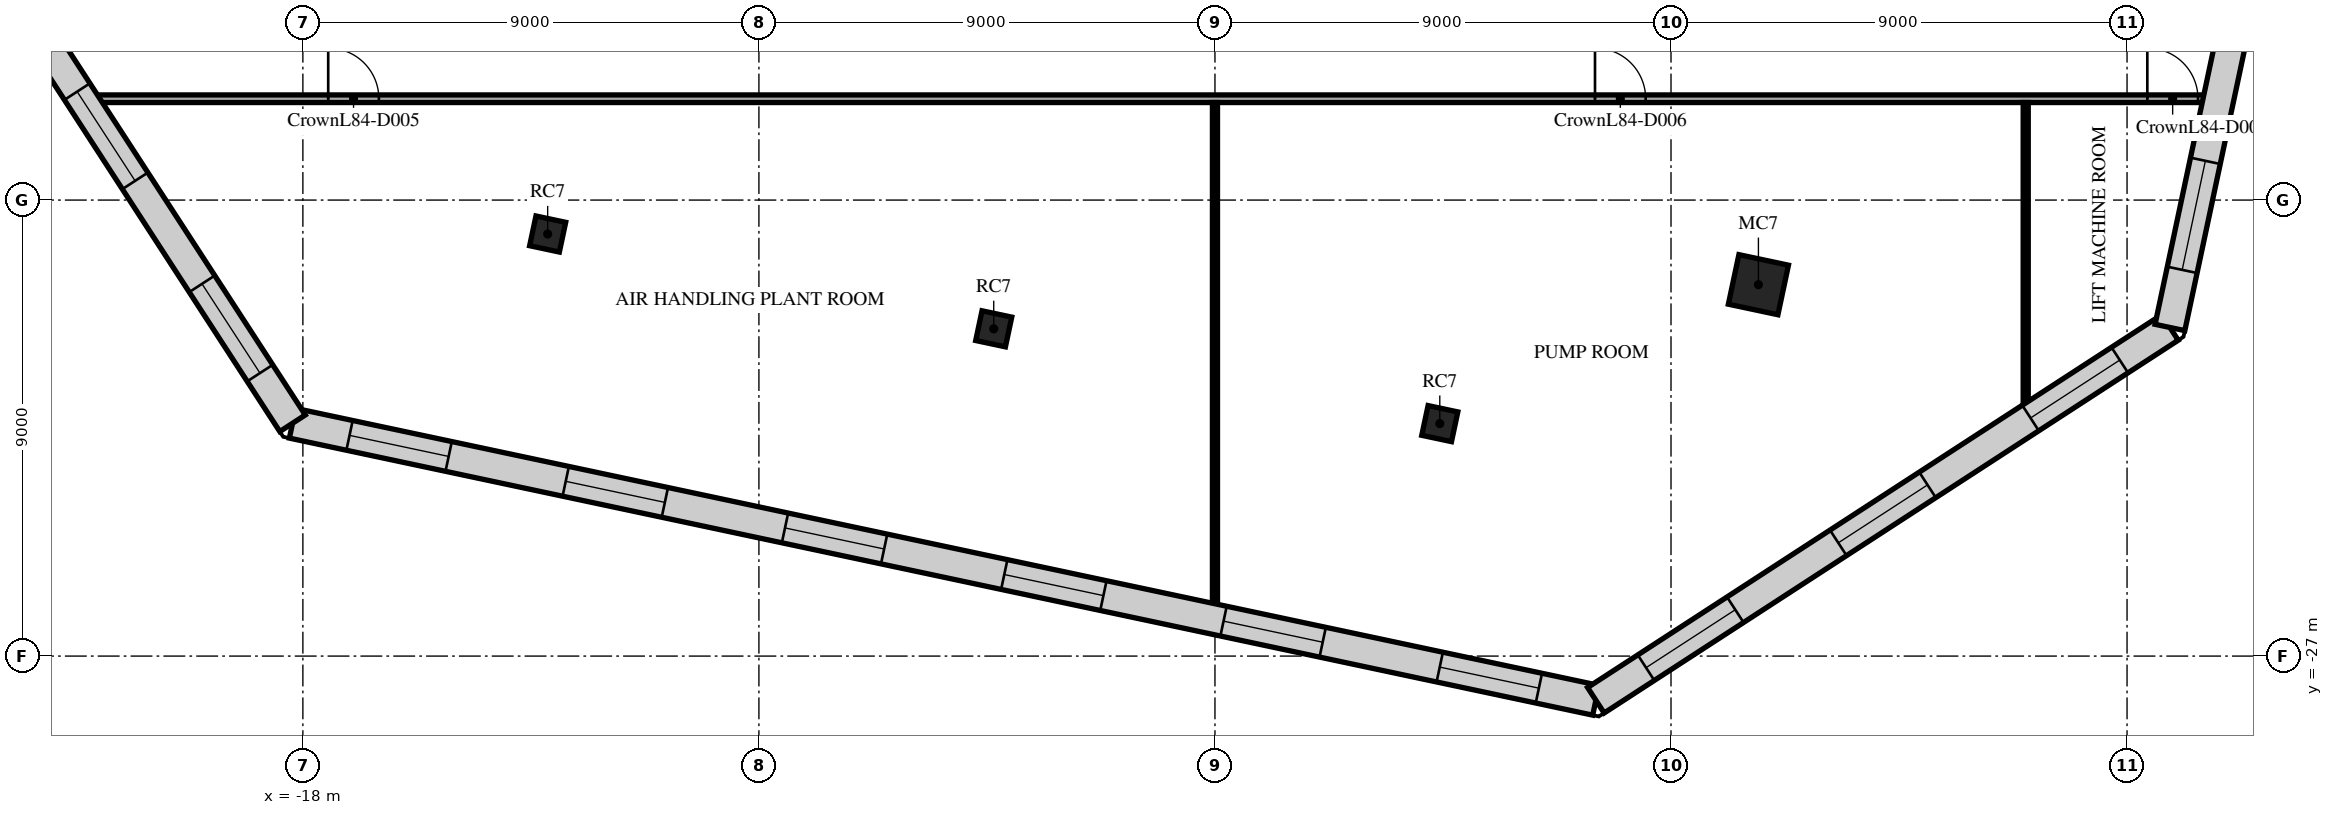
"""IFC4 building model, lengths in metres.
Left out: names, types, materials, properties, quantities, classifications, styles, units other than length and angle.
Written with IfcOpenShell. Run it as: python <this file> out.ifc"""

import sys

from ifc_helpers import new_model, si_unit, direction, frame, frame_2d, origin, origin_2d, place, context, subcontext, project, spatial, rectangle, extrude, element, fill, save


model = new_model("IFC4")
c1 = context("Model", 3, precision=1e-05, world=origin(), true_north=direction((0.0, 1.0)))
c2 = subcontext(c1, "Body", "Model", "MODEL_VIEW")
j1 = project(units=[si_unit("LENGTHUNIT", "METRE"), si_unit("PLANEANGLEUNIT", "RADIAN")], contexts=[c1])
p1 = place(None, origin())
s1 = spatial("IfcSite", under=j1, at=p1, CompositionType="ELEMENT")
p2 = place(p1, origin())
s2 = spatial("IfcBuilding", under=s1, at=p2, CompositionType="ELEMENT")
p3 = place(p2, frame((0.0, 0.0, 358.1)))
s3 = spatial("IfcBuildingStorey", under=s2, at=p3, CompositionType="ELEMENT", Elevation=358.1)
for number, where, z_axis, x_axis in (
    (1, (-13.169, -18.67, 0.0), (0.0, 0.0, 1.0), (0.208, 0.978, 0.0)),
    (2, (-4.366, -20.541, 0.0), (0.0, 0.0, 1.0), (0.208, 0.978, 0.0)),
    (3, (4.437, -22.412, 0.0), (0.0, 0.0, 1.0), (0.208, 0.978, 0.0)),
):
    element("IfcColumn", number, at=place(p3, frame(where, z_axis=z_axis, x_axis=x_axis)), inside=s3, PredefinedType="COLUMN", context=c2, shape_type="SweptSolid", body=[
        extrude(rectangle(XDim=0.6, YDim=0.6, at=origin_2d()), origin(), (0.0, 0.0, 1.0), 5.0),
    ])
p4 = place(p3, frame((10.725, -19.67, 0.0), z_axis=(0.0, 0.0, 1.0), x_axis=(0.207911690818, 0.978147600734, 0.0)))
e4 = element("IfcColumn", 4, at=p4, inside=s3, PredefinedType="COLUMN", context=c2, shape_type="SweptSolid", body=[
    extrude(rectangle(XDim=1.0, YDim=1.0, at=origin_2d()), origin(), (0.0, 0.0, 1.0), 5.0),
])
p5 = place(p3, frame((-22.244, -16.0, 0.0), z_axis=(0.0, 0.0, 1.0), x_axis=(1.0, 0.0, 0.0)))
e5 = element("IfcWall", 5, at=p5, inside=s3, PredefinedType="PARTITIONING", context=c2, shape_type="SweptSolid", body=[
    extrude(rectangle(XDim=41.948, YDim=0.15, at=frame_2d((20.974, 0.0))), origin(), (0.0, 0.0, 1.0), 4.32),
])
p6 = place(p5, frame((4.744, 0.0, 0.0)))
e6 = element("IfcOpeningElement", 6, at=p6, cuts=e5, PredefinedType="OPENING", context=c2, shape_type="SweptSolid", body=[
    extrude(rectangle(XDim=1.0, YDim=2.1, at=frame_2d((0.5, 1.05))), frame((0.0, 0.085, 0.0), z_axis=(0.0, -1.0, 0.0), x_axis=(1.0, 0.0, 0.0)), (0.0, 0.0, 1.0), 0.17),
])
p7 = place(p5, frame((29.744, 0.0, 0.0)))
e7 = element("IfcOpeningElement", 7, at=p7, cuts=e5, PredefinedType="OPENING", context=c2, shape_type="SweptSolid", body=[
    extrude(rectangle(XDim=1.0, YDim=2.1, at=frame_2d((0.5, 1.05))), frame((0.0, 0.085, 0.0), z_axis=(0.0, -1.0, 0.0), x_axis=(1.0, 0.0, 0.0)), (0.0, 0.0, 1.0), 0.17),
])
p8 = place(p5, frame((40.644, 0.0, 0.0)))
e8 = element("IfcOpeningElement", 8, at=p8, cuts=e5, PredefinedType="OPENING", context=c2, shape_type="SweptSolid", body=[
    extrude(rectangle(XDim=1.0, YDim=2.1, at=frame_2d((0.5, 1.05))), frame((0.0, 0.085, 0.0), z_axis=(0.0, -1.0, 0.0), x_axis=(1.0, 0.0, 0.0)), (0.0, 0.0, 1.0), 0.17),
])
p9 = place(p3, frame((0.0, -26.172, 0.0), z_axis=(0.0, 0.0, 1.0), x_axis=(0.0, 1.0, 0.0)))
e9 = element("IfcWall", 9, at=p9, inside=s3, PredefinedType="PARTITIONING", context=c2, shape_type="SweptSolid", body=[
    extrude(rectangle(XDim=10.097, YDim=0.1, at=frame_2d((5.048, 0.0))), origin(), (0.0, 0.0, 1.0), 4.7),
])
p10 = place(p3, frame((16.0, -22.244, 0.0), z_axis=(0.0, 0.0, 1.0), x_axis=(0.0, 1.0, 0.0)))
e10 = element("IfcWall", 10, at=p10, inside=s3, PredefinedType="PARTITIONING", context=c2, shape_type="SweptSolid", body=[
    extrude(rectangle(XDim=6.169, YDim=0.1, at=frame_2d((3.084, 0.0))), origin(), (0.0, 0.0, 1.0), 4.7),
])
p11 = place(p3, frame((-18.204, -22.405, 0.0), z_axis=(0.0, 0.0, 1.0), x_axis=(0.978146602716, -0.207916386066, 0.0)))
e11 = element("IfcWall", 11, at=p11, inside=s3, PredefinedType="STANDARD", context=c2, shape_type="SweptSolid", body=[
    extrude(rectangle(XDim=26.296, YDim=0.6, at=frame_2d((13.148, 0.0))), origin(), (0.0, 0.0, 1.0), 4.7),
])
p12 = place(p11, frame((1.15, 0.0, 0.6)))
e12 = element("IfcOpeningElement", 12, at=p12, cuts=e11, PredefinedType="OPENING", context=c2, shape_type="SweptSolid", body=[
    extrude(rectangle(XDim=2.0, YDim=3.35, at=frame_2d((1.0, 1.675))), frame((0.0, 0.31, 0.0), z_axis=(0.0, -1.0, 0.0), x_axis=(1.0, 0.0, 0.0)), (0.0, 0.0, 1.0), 0.62),
])
p13 = place(p11, frame((5.512, 0.0, 0.6)))
e13 = element("IfcOpeningElement", 13, at=p13, cuts=e11, PredefinedType="OPENING", context=c2, shape_type="SweptSolid", body=[
    extrude(rectangle(XDim=2.0, YDim=3.35, at=frame_2d((1.0, 1.675))), frame((0.0, 0.31, 0.0), z_axis=(0.0, -1.0, 0.0), x_axis=(1.0, 0.0, 0.0)), (0.0, 0.0, 1.0), 0.62),
])
p14 = place(p11, frame((9.936, 0.0, 0.6)))
e14 = element("IfcOpeningElement", 14, at=p14, cuts=e11, PredefinedType="OPENING", context=c2, shape_type="SweptSolid", body=[
    extrude(rectangle(XDim=2.0, YDim=3.35, at=frame_2d((1.0, 1.675))), frame((0.0, 0.31, 0.0), z_axis=(0.0, -1.0, 0.0), x_axis=(1.0, 0.0, 0.0)), (0.0, 0.0, 1.0), 0.62),
])
p15 = place(p11, frame((14.36, 0.0, 0.6)))
e15 = element("IfcOpeningElement", 15, at=p15, cuts=e11, PredefinedType="OPENING", context=c2, shape_type="SweptSolid", body=[
    extrude(rectangle(XDim=2.0, YDim=3.35, at=frame_2d((1.0, 1.675))), frame((0.0, 0.31, 0.0), z_axis=(0.0, -1.0, 0.0), x_axis=(1.0, 0.0, 0.0)), (0.0, 0.0, 1.0), 0.62),
])
p16 = place(p11, frame((18.784, 0.0, 0.6)))
e16 = element("IfcOpeningElement", 16, at=p16, cuts=e11, PredefinedType="OPENING", context=c2, shape_type="SweptSolid", body=[
    extrude(rectangle(XDim=2.0, YDim=3.35, at=frame_2d((1.0, 1.675))), frame((0.0, 0.31, 0.0), z_axis=(0.0, -1.0, 0.0), x_axis=(1.0, 0.0, 0.0)), (0.0, 0.0, 1.0), 0.62),
])
p17 = place(p11, frame((23.146, 0.0, 0.6)))
e17 = element("IfcOpeningElement", 17, at=p17, cuts=e11, PredefinedType="OPENING", context=c2, shape_type="SweptSolid", body=[
    extrude(rectangle(XDim=2.0, YDim=3.35, at=frame_2d((1.0, 1.675))), frame((0.0, 0.31, 0.0), z_axis=(0.0, -1.0, 0.0), x_axis=(1.0, 0.0, 0.0)), (0.0, 0.0, 1.0), 0.62),
])
p18 = place(p3, frame((7.517, -27.872, 0.0), z_axis=(0.0, 0.0, 1.0), x_axis=(0.838665687332, 0.544646550427, 0.0)))
e18 = element("IfcWall", 18, at=p18, inside=s3, PredefinedType="STANDARD", context=c2, shape_type="SweptSolid", body=[
    extrude(rectangle(XDim=13.509, YDim=0.6, at=frame_2d((6.754, 0.0))), origin(), (0.0, 0.0, 1.0), 4.7),
])
p19 = place(p18, frame((1.181, 0.0, 0.6)))
e19 = element("IfcOpeningElement", 19, at=p19, cuts=e18, PredefinedType="OPENING", context=c2, shape_type="SweptSolid", body=[
    extrude(rectangle(XDim=2.1, YDim=3.35, at=frame_2d((1.05, 1.675))), frame((0.0, 0.31, 0.0), z_axis=(0.0, -1.0, 0.0), x_axis=(1.0, 0.0, 0.0)), (0.0, 0.0, 1.0), 0.62),
])
p20 = place(p18, frame((5.704, 0.0, 0.6)))
e20 = element("IfcOpeningElement", 20, at=p20, cuts=e18, PredefinedType="OPENING", context=c2, shape_type="SweptSolid", body=[
    extrude(rectangle(XDim=2.1, YDim=3.35, at=frame_2d((1.05, 1.675))), frame((0.0, 0.31, 0.0), z_axis=(0.0, -1.0, 0.0), x_axis=(1.0, 0.0, 0.0)), (0.0, 0.0, 1.0), 0.62),
])
p21 = place(p18, frame((10.228, 0.0, 0.6)))
e21 = element("IfcOpeningElement", 21, at=p21, cuts=e18, PredefinedType="OPENING", context=c2, shape_type="SweptSolid", body=[
    extrude(rectangle(XDim=2.1, YDim=3.35, at=frame_2d((1.05, 1.675))), frame((0.0, 0.31, 0.0), z_axis=(0.0, -1.0, 0.0), x_axis=(1.0, 0.0, 0.0)), (0.0, 0.0, 1.0), 0.62),
])
p22 = place(p3, frame((18.847, -20.514, 0.0), z_axis=(0.0, 0.0, 1.0), x_axis=(0.207910832809, 0.978147783109, 0.0)))
e22 = element("IfcWall", 22, at=p22, inside=s3, PredefinedType="STANDARD", context=c2, shape_type="SweptSolid", body=[
    extrude(rectangle(XDim=32.296, YDim=0.6, at=frame_2d((16.148, 0.0))), origin(), (0.0, 0.0, 1.0), 4.7),
])
p23 = place(p22, frame((1.163, 0.0, 0.6)))
e23 = element("IfcOpeningElement", 23, at=p23, cuts=e22, PredefinedType="OPENING", context=c2, shape_type="SweptSolid", body=[
    extrude(rectangle(XDim=2.2, YDim=3.35, at=frame_2d((1.1, 1.675))), frame((0.0, 0.31, 0.0), z_axis=(0.0, -1.0, 0.0), x_axis=(1.0, 0.0, 0.0)), (0.0, 0.0, 1.0), 0.62),
])
p24 = place(p22, frame((5.75, 0.0, 0.6)))
e24 = element("IfcOpeningElement", 24, at=p24, cuts=e22, PredefinedType="OPENING", context=c2, shape_type="SweptSolid", body=[
    extrude(rectangle(XDim=2.2, YDim=3.35, at=frame_2d((1.1, 1.675))), frame((0.0, 0.31, 0.0), z_axis=(0.0, -1.0, 0.0), x_axis=(1.0, 0.0, 0.0)), (0.0, 0.0, 1.0), 0.62),
])
p25 = place(p22, frame((10.399, 0.0, 0.6)))
e25 = element("IfcOpeningElement", 25, at=p25, cuts=e22, PredefinedType="OPENING", context=c2, shape_type="SweptSolid", body=[
    extrude(rectangle(XDim=2.2, YDim=3.35, at=frame_2d((1.1, 1.675))), frame((0.0, 0.31, 0.0), z_axis=(0.0, -1.0, 0.0), x_axis=(1.0, 0.0, 0.0)), (0.0, 0.0, 1.0), 0.62),
])
p26 = place(p22, frame((15.048, 0.0, 0.6)))
e26 = element("IfcOpeningElement", 26, at=p26, cuts=e22, PredefinedType="OPENING", context=c2, shape_type="SweptSolid", body=[
    extrude(rectangle(XDim=2.2, YDim=3.35, at=frame_2d((1.1, 1.675))), frame((0.0, 0.31, 0.0), z_axis=(0.0, -1.0, 0.0), x_axis=(1.0, 0.0, 0.0)), (0.0, 0.0, 1.0), 0.62),
])
p27 = place(p22, frame((19.697, 0.0, 0.6)))
e27 = element("IfcOpeningElement", 27, at=p27, cuts=e22, PredefinedType="OPENING", context=c2, shape_type="SweptSolid", body=[
    extrude(rectangle(XDim=2.2, YDim=3.35, at=frame_2d((1.1, 1.675))), frame((0.0, 0.31, 0.0), z_axis=(0.0, -1.0, 0.0), x_axis=(1.0, 0.0, 0.0)), (0.0, 0.0, 1.0), 0.62),
])
p28 = place(p22, frame((24.346, 0.0, 0.6)))
e28 = element("IfcOpeningElement", 28, at=p28, cuts=e22, PredefinedType="OPENING", context=c2, shape_type="SweptSolid", body=[
    extrude(rectangle(XDim=2.2, YDim=3.35, at=frame_2d((1.1, 1.675))), frame((0.0, 0.31, 0.0), z_axis=(0.0, -1.0, 0.0), x_axis=(1.0, 0.0, 0.0)), (0.0, 0.0, 1.0), 0.62),
])
p29 = place(p22, frame((28.933, 0.0, 0.6)))
e29 = element("IfcOpeningElement", 29, at=p29, cuts=e22, PredefinedType="OPENING", context=c2, shape_type="SweptSolid", body=[
    extrude(rectangle(XDim=2.2, YDim=3.35, at=frame_2d((1.1, 1.675))), frame((0.0, 0.31, 0.0), z_axis=(0.0, -1.0, 0.0), x_axis=(1.0, 0.0, 0.0)), (0.0, 0.0, 1.0), 0.62),
])
p30 = place(p3, frame((-25.561, -11.075, 0.0), z_axis=(0.0, 0.0, 1.0), x_axis=(0.544642093959, -0.838668581436, 0.0)))
e30 = element("IfcWall", 30, at=p30, inside=s3, PredefinedType="STANDARD", context=c2, shape_type="SweptSolid", body=[
    extrude(rectangle(XDim=13.509, YDim=0.6, at=frame_2d((6.754, 0.0))), origin(), (0.0, 0.0, 1.0), 4.7),
])
p31 = place(p30, frame((1.181, 0.0, 0.6)))
e31 = element("IfcOpeningElement", 31, at=p31, cuts=e30, PredefinedType="OPENING", context=c2, shape_type="SweptSolid", body=[
    extrude(rectangle(XDim=2.1, YDim=3.35, at=frame_2d((1.05, 1.675))), frame((0.0, 0.31, 0.0), z_axis=(0.0, -1.0, 0.0), x_axis=(1.0, 0.0, 0.0)), (0.0, 0.0, 1.0), 0.62),
])
p32 = place(p30, frame((5.704, 0.0, 0.6)))
e32 = element("IfcOpeningElement", 32, at=p32, cuts=e30, PredefinedType="OPENING", context=c2, shape_type="SweptSolid", body=[
    extrude(rectangle(XDim=2.1, YDim=3.35, at=frame_2d((1.05, 1.675))), frame((0.0, 0.31, 0.0), z_axis=(0.0, -1.0, 0.0), x_axis=(1.0, 0.0, 0.0)), (0.0, 0.0, 1.0), 0.62),
])
p33 = place(p30, frame((10.228, 0.0, 0.6)))
e33 = element("IfcOpeningElement", 33, at=p33, cuts=e30, PredefinedType="OPENING", context=c2, shape_type="SweptSolid", body=[
    extrude(rectangle(XDim=2.1, YDim=3.35, at=frame_2d((1.05, 1.675))), frame((0.0, 0.31, 0.0), z_axis=(0.0, -1.0, 0.0), x_axis=(1.0, 0.0, 0.0)), (0.0, 0.0, 1.0), 0.62),
])
p34 = place(p6, origin())
e34 = element("IfcDoor", 34, at=p34, inside=s3, OperationType="SINGLE_SWING_LEFT", PredefinedType="DOOR", context=c2, shape_type="SweptSolid", body=[
    extrude(rectangle(XDim=1.0, YDim=2.1, at=frame_2d((0.5, 1.05))), frame((0.0, 0.025, 0.0), z_axis=(0.0, -1.0, 0.0), x_axis=(1.0, 0.0, 0.0)), (0.0, 0.0, 1.0), 0.05),
])
fill(e6, e34)
p35 = place(p7, origin())
e35 = element("IfcDoor", 35, at=p35, inside=s3, OperationType="SINGLE_SWING_RIGHT", PredefinedType="DOOR", context=c2, shape_type="SweptSolid", body=[
    extrude(rectangle(XDim=1.0, YDim=2.1, at=frame_2d((0.5, 1.05))), frame((0.0, 0.025, 0.0), z_axis=(0.0, -1.0, 0.0), x_axis=(1.0, 0.0, 0.0)), (0.0, 0.0, 1.0), 0.05),
])
fill(e7, e35)
p36 = place(p8, origin())
e36 = element("IfcDoor", 36, at=p36, inside=s3, OperationType="SINGLE_SWING_LEFT", PredefinedType="DOOR", context=c2, shape_type="SweptSolid", body=[
    extrude(rectangle(XDim=1.0, YDim=2.1, at=frame_2d((0.5, 1.05))), frame((0.0, 0.025, 0.0), z_axis=(0.0, -1.0, 0.0), x_axis=(1.0, 0.0, 0.0)), (0.0, 0.0, 1.0), 0.05),
])
fill(e8, e36)
p37 = place(p12, origin())
e37 = element("IfcWindow", 37, at=p37, inside=s3, PartitioningType="SINGLE_PANEL", PredefinedType="USERDEFINED", context=c2, shape_type="SweptSolid", body=[
    extrude(rectangle(XDim=2.0, YDim=3.35, at=frame_2d((1.0, 1.675))), frame((0.0, 0.03, 0.0), z_axis=(0.0, -1.0, 0.0), x_axis=(1.0, 0.0, 0.0)), (0.0, 0.0, 1.0), 0.06),
])
fill(e12, e37)
p38 = place(p13, origin())
e38 = element("IfcWindow", 38, at=p38, inside=s3, PartitioningType="SINGLE_PANEL", PredefinedType="USERDEFINED", context=c2, shape_type="SweptSolid", body=[
    extrude(rectangle(XDim=2.0, YDim=3.35, at=frame_2d((1.0, 1.675))), frame((0.0, 0.03, 0.0), z_axis=(0.0, -1.0, 0.0), x_axis=(1.0, 0.0, 0.0)), (0.0, 0.0, 1.0), 0.06),
])
fill(e13, e38)
p39 = place(p14, origin())
e39 = element("IfcWindow", 39, at=p39, inside=s3, PartitioningType="SINGLE_PANEL", PredefinedType="USERDEFINED", context=c2, shape_type="SweptSolid", body=[
    extrude(rectangle(XDim=2.0, YDim=3.35, at=frame_2d((1.0, 1.675))), frame((0.0, 0.03, 0.0), z_axis=(0.0, -1.0, 0.0), x_axis=(1.0, 0.0, 0.0)), (0.0, 0.0, 1.0), 0.06),
])
fill(e14, e39)
p40 = place(p15, origin())
e40 = element("IfcWindow", 40, at=p40, inside=s3, PartitioningType="SINGLE_PANEL", PredefinedType="USERDEFINED", context=c2, shape_type="SweptSolid", body=[
    extrude(rectangle(XDim=2.0, YDim=3.35, at=frame_2d((1.0, 1.675))), frame((0.0, 0.03, 0.0), z_axis=(0.0, -1.0, 0.0), x_axis=(1.0, 0.0, 0.0)), (0.0, 0.0, 1.0), 0.06),
])
fill(e15, e40)
p41 = place(p16, origin())
e41 = element("IfcWindow", 41, at=p41, inside=s3, PartitioningType="SINGLE_PANEL", PredefinedType="USERDEFINED", context=c2, shape_type="SweptSolid", body=[
    extrude(rectangle(XDim=2.0, YDim=3.35, at=frame_2d((1.0, 1.675))), frame((0.0, 0.03, 0.0), z_axis=(0.0, -1.0, 0.0), x_axis=(1.0, 0.0, 0.0)), (0.0, 0.0, 1.0), 0.06),
])
fill(e16, e41)
p42 = place(p17, origin())
e42 = element("IfcWindow", 42, at=p42, inside=s3, PartitioningType="SINGLE_PANEL", PredefinedType="USERDEFINED", context=c2, shape_type="SweptSolid", body=[
    extrude(rectangle(XDim=2.0, YDim=3.35, at=frame_2d((1.0, 1.675))), frame((0.0, 0.03, 0.0), z_axis=(0.0, -1.0, 0.0), x_axis=(1.0, 0.0, 0.0)), (0.0, 0.0, 1.0), 0.06),
])
fill(e17, e42)
p43 = place(p19, origin())
e43 = element("IfcWindow", 43, at=p43, inside=s3, PartitioningType="SINGLE_PANEL", PredefinedType="USERDEFINED", context=c2, shape_type="SweptSolid", body=[
    extrude(rectangle(XDim=2.1, YDim=3.35, at=frame_2d((1.05, 1.675))), frame((0.0, 0.03, 0.0), z_axis=(0.0, -1.0, 0.0), x_axis=(1.0, 0.0, 0.0)), (0.0, 0.0, 1.0), 0.06),
])
fill(e19, e43)
p44 = place(p20, origin())
e44 = element("IfcWindow", 44, at=p44, inside=s3, PartitioningType="SINGLE_PANEL", PredefinedType="USERDEFINED", context=c2, shape_type="SweptSolid", body=[
    extrude(rectangle(XDim=2.1, YDim=3.35, at=frame_2d((1.05, 1.675))), frame((0.0, 0.03, 0.0), z_axis=(0.0, -1.0, 0.0), x_axis=(1.0, 0.0, 0.0)), (0.0, 0.0, 1.0), 0.06),
])
fill(e20, e44)
p45 = place(p21, origin())
e45 = element("IfcWindow", 45, at=p45, inside=s3, PartitioningType="SINGLE_PANEL", PredefinedType="USERDEFINED", context=c2, shape_type="SweptSolid", body=[
    extrude(rectangle(XDim=2.1, YDim=3.35, at=frame_2d((1.05, 1.675))), frame((0.0, 0.03, 0.0), z_axis=(0.0, -1.0, 0.0), x_axis=(1.0, 0.0, 0.0)), (0.0, 0.0, 1.0), 0.06),
])
fill(e21, e45)
p46 = place(p23, origin())
e46 = element("IfcWindow", 46, at=p46, inside=s3, PartitioningType="SINGLE_PANEL", PredefinedType="USERDEFINED", context=c2, shape_type="SweptSolid", body=[
    extrude(rectangle(XDim=2.2, YDim=3.35, at=frame_2d((1.1, 1.675))), frame((0.0, 0.03, 0.0), z_axis=(0.0, -1.0, 0.0), x_axis=(1.0, 0.0, 0.0)), (0.0, 0.0, 1.0), 0.06),
])
fill(e23, e46)
p47 = place(p32, origin())
e47 = element("IfcWindow", 47, at=p47, inside=s3, PartitioningType="SINGLE_PANEL", PredefinedType="USERDEFINED", context=c2, shape_type="SweptSolid", body=[
    extrude(rectangle(XDim=2.1, YDim=3.35, at=frame_2d((1.05, 1.675))), frame((0.0, 0.03, 0.0), z_axis=(0.0, -1.0, 0.0), x_axis=(1.0, 0.0, 0.0)), (0.0, 0.0, 1.0), 0.06),
])
fill(e32, e47)
p48 = place(p33, origin())
e48 = element("IfcWindow", 48, at=p48, inside=s3, PartitioningType="SINGLE_PANEL", PredefinedType="USERDEFINED", context=c2, shape_type="SweptSolid", body=[
    extrude(rectangle(XDim=2.1, YDim=3.35, at=frame_2d((1.05, 1.675))), frame((0.0, 0.03, 0.0), z_axis=(0.0, -1.0, 0.0), x_axis=(1.0, 0.0, 0.0)), (0.0, 0.0, 1.0), 0.06),
])
fill(e33, e48)
save(model, sys.argv[1])
